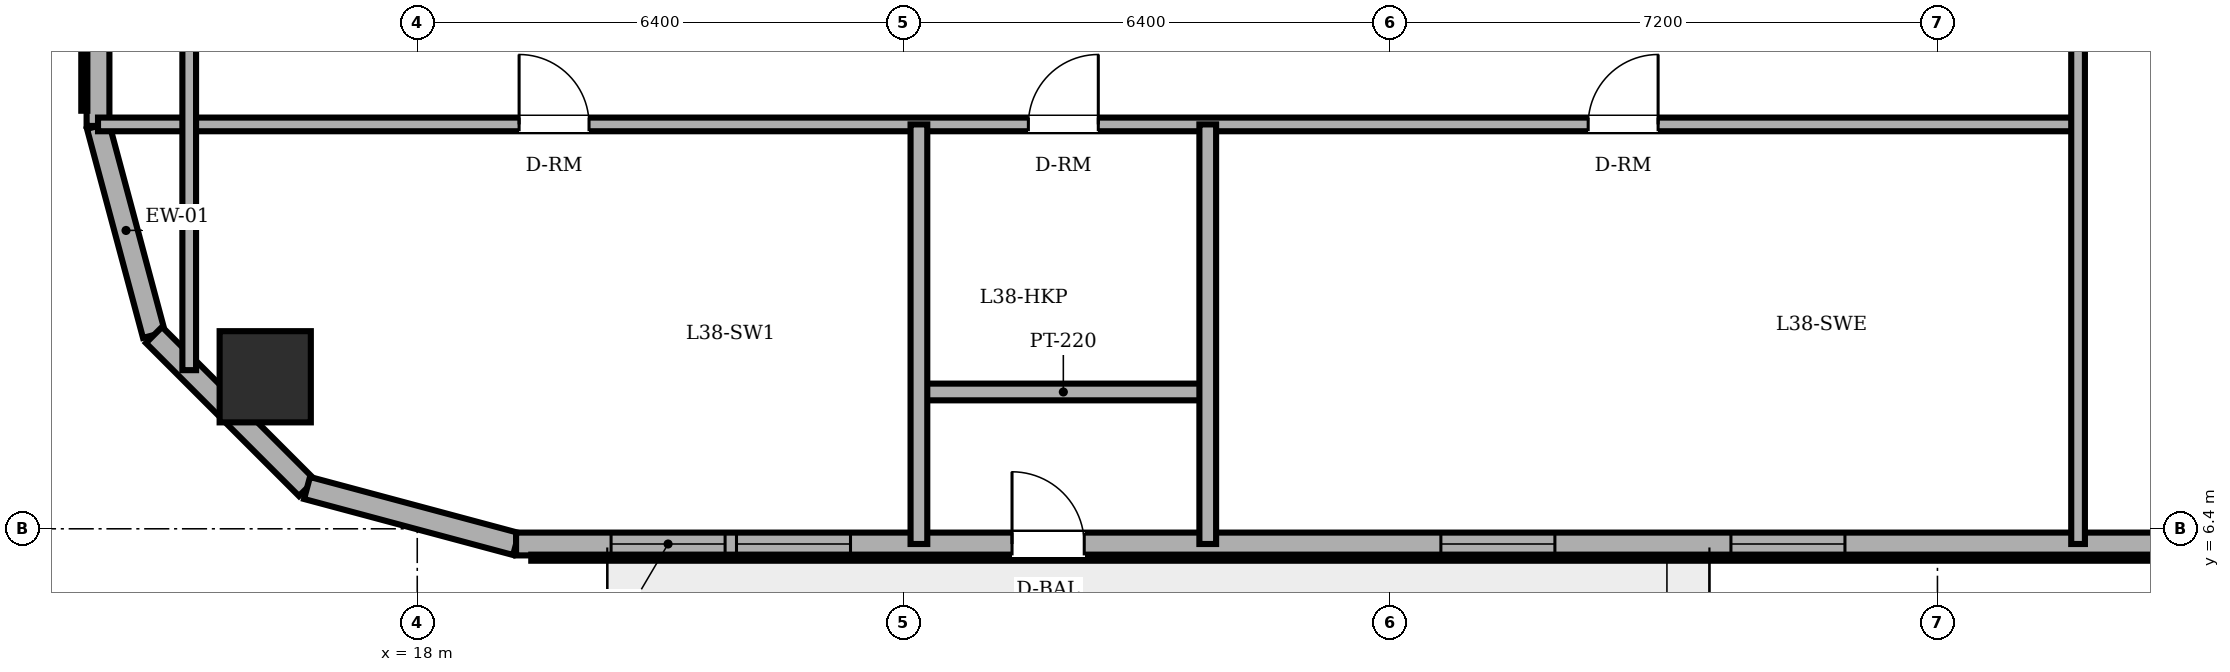
"""IFC4 building model, lengths in metres.
Left out: names, types, materials, properties, quantities, classifications, styles, units other than length and angle.
Written with IfcOpenShell. Run it as: python <this file> out.ifc"""

import sys

from ifc_helpers import new_model, si_unit, direction, frame, frame_2d, origin, origin_2d, place, context, subcontext, project, spatial, rectangle, circle, extrude, element, fill, save


model = new_model("IFC4")
c1 = context("Model", 3, precision=1e-05, world=origin(), true_north=direction((0.0, 1.0)))
c2 = subcontext(c1, "Body", "Model", "MODEL_VIEW")
j1 = project(units=[si_unit("LENGTHUNIT", "METRE"), si_unit("PLANEANGLEUNIT", "RADIAN")], contexts=[c1])
p1 = place(None, origin())
s1 = spatial("IfcSite", under=j1, at=p1, CompositionType="ELEMENT")
p2 = place(p1, origin())
s2 = spatial("IfcBuilding", under=s1, at=p2, CompositionType="ELEMENT")
p3 = place(p2, frame((0.0, 0.0, 147.4)))
s3 = spatial("IfcBuildingStorey", under=s2, at=p3, CompositionType="ELEMENT", Elevation=147.4)
p4 = place(p3, frame((16.0, 8.4, 0.0), z_axis=(0.0, 0.0, 1.0), x_axis=(1.0, 0.0, 0.0)))
e1 = element("IfcColumn", 1, at=p4, inside=s3, PredefinedType="COLUMN", context=c2, shape_type="SweptSolid", body=[
    extrude(circle(Radius=0.6, at=origin_2d()), origin(), (0.0, 0.0, 1.0), 3.6),
])
p5 = place(p3, frame((13.8, 11.7, 0.0), z_axis=(0.0, 0.0, 1.0), x_axis=(0.258884674387, -0.965908238586, 0.0)))
e2 = element("IfcWall", 2, at=p5, inside=s3, PredefinedType="SOLIDWALL", context=c2, shape_type="SweptSolid", body=[
    extrude(rectangle(XDim=2.847, YDim=0.3, at=frame_2d((1.424, 0.0))), origin(), (0.0, 0.0, 1.0), 3.4),
])
p6 = place(p3, frame((14.537, 8.95, 0.0), z_axis=(0.0, 0.0, 1.0), x_axis=(0.707106781187, -0.707106781187, 0.0)))
e3 = element("IfcWall", 3, at=p6, inside=s3, PredefinedType="SOLIDWALL", context=c2, shape_type="SweptSolid", body=[
    extrude(rectangle(XDim=2.847, YDim=0.3, at=frame_2d((1.423, 0.0))), origin(), (0.0, 0.0, 1.0), 3.4),
])
p7 = place(p3, frame((16.55, 6.937, 0.0), z_axis=(0.0, 0.0, 1.0), x_axis=(0.965908238586, -0.258884674387, 0.0)))
e4 = element("IfcWall", 4, at=p7, inside=s3, PredefinedType="SOLIDWALL", context=c2, shape_type="SweptSolid", body=[
    extrude(rectangle(XDim=2.847, YDim=0.3, at=frame_2d((1.424, 0.0))), origin(), (0.0, 0.0, 1.0), 3.4),
])
p8 = place(p3, frame((19.3, 6.2, 0.0), z_axis=(0.0, 0.0, 1.0), x_axis=(1.0, 0.0, 0.0)))
e5 = element("IfcWall", 5, at=p8, inside=s3, PredefinedType="SOLIDWALL", context=c2, shape_type="SweptSolid", body=[
    extrude(rectangle(XDim=30.282, YDim=0.3, at=frame_2d((15.141, 0.0))), origin(), (0.0, 0.0, 1.0), 3.4),
])
p9 = place(p8, frame((6.525, 0.0, 0.0)))
e6 = element("IfcOpeningElement", 6, at=p9, cuts=e5, PredefinedType="OPENING", context=c2, shape_type="SweptSolid", body=[
    extrude(rectangle(XDim=0.95, YDim=2.2, at=frame_2d((0.475, 1.1))), frame((0.0, 0.16, 0.0), z_axis=(0.0, -1.0, 0.0), x_axis=(1.0, 0.0, 0.0)), (0.0, 0.0, 1.0), 0.32),
])
p10 = place(p8, frame((1.25, 0.0, 0.85)))
e7 = element("IfcOpeningElement", 7, at=p10, cuts=e5, PredefinedType="OPENING", context=c2, shape_type="SweptSolid", body=[
    extrude(rectangle(XDim=1.5, YDim=1.55, at=frame_2d((0.75, 0.775))), frame((0.0, 0.16, 0.0), z_axis=(0.0, -1.0, 0.0), x_axis=(1.0, 0.0, 0.0)), (0.0, 0.0, 1.0), 0.32),
])
p11 = place(p8, frame((2.9, 0.0, 0.85)))
e8 = element("IfcOpeningElement", 8, at=p11, cuts=e5, PredefinedType="OPENING", context=c2, shape_type="SweptSolid", body=[
    extrude(rectangle(XDim=1.5, YDim=1.55, at=frame_2d((0.75, 0.775))), frame((0.0, 0.16, 0.0), z_axis=(0.0, -1.0, 0.0), x_axis=(1.0, 0.0, 0.0)), (0.0, 0.0, 1.0), 0.32),
])
p12 = place(p8, frame((12.167, 0.0, 0.85)))
e9 = element("IfcOpeningElement", 9, at=p12, cuts=e5, PredefinedType="OPENING", context=c2, shape_type="SweptSolid", body=[
    extrude(rectangle(XDim=1.5, YDim=1.55, at=frame_2d((0.75, 0.775))), frame((0.0, 0.16, 0.0), z_axis=(0.0, -1.0, 0.0), x_axis=(1.0, 0.0, 0.0)), (0.0, 0.0, 1.0), 0.32),
])
p13 = place(p8, frame((15.983, 0.0, 0.85)))
e10 = element("IfcOpeningElement", 10, at=p13, cuts=e5, PredefinedType="OPENING", context=c2, shape_type="SweptSolid", body=[
    extrude(rectangle(XDim=1.5, YDim=1.55, at=frame_2d((0.75, 0.775))), frame((0.0, 0.16, 0.0), z_axis=(0.0, -1.0, 0.0), x_axis=(1.0, 0.0, 0.0)), (0.0, 0.0, 1.0), 0.32),
])
p14 = place(p8, frame((22.484, 0.0, 0.85)))
e11 = element("IfcOpeningElement", 11, at=p14, cuts=e5, PredefinedType="OPENING", context=c2, shape_type="SweptSolid", body=[
    extrude(rectangle(XDim=1.5, YDim=1.55, at=frame_2d((0.75, 0.775))), frame((0.0, 0.16, 0.0), z_axis=(0.0, -1.0, 0.0), x_axis=(1.0, 0.0, 0.0)), (0.0, 0.0, 1.0), 0.32),
])
p15 = place(p8, frame((25.168, 0.0, 0.85)))
e12 = element("IfcOpeningElement", 12, at=p15, cuts=e5, PredefinedType="OPENING", context=c2, shape_type="SweptSolid", body=[
    extrude(rectangle(XDim=1.5, YDim=1.55, at=frame_2d((0.75, 0.775))), frame((0.0, 0.16, 0.0), z_axis=(0.0, -1.0, 0.0), x_axis=(1.0, 0.0, 0.0)), (0.0, 0.0, 1.0), 0.32),
])
p16 = place(p8, frame((28.773, 0.0, 0.85)))
e13 = element("IfcOpeningElement", 13, at=p16, cuts=e5, PredefinedType="OPENING", context=c2, shape_type="SweptSolid", body=[
    extrude(rectangle(XDim=1.05, YDim=1.55, at=frame_2d((0.525, 0.775))), frame((0.0, 0.16, 0.0), z_axis=(0.0, -1.0, 0.0), x_axis=(1.0, 0.0, 0.0)), (0.0, 0.0, 1.0), 0.32),
])
p17 = place(p3, frame((13.8, 36.3, 0.0), z_axis=(0.0, 0.0, 1.0), x_axis=(0.0, -1.0, 0.0)))
e14 = element("IfcWall", 14, at=p17, inside=s3, PredefinedType="SOLIDWALL", context=c2, shape_type="SweptSolid", body=[
    extrude(rectangle(XDim=24.6, YDim=0.3, at=frame_2d((12.3, 0.0))), origin(), (0.0, 0.0, 1.0), 3.4),
])
p18 = place(p17, frame((5.003, 0.0, 0.85)))
e15 = element("IfcOpeningElement", 15, at=p18, cuts=e14, PredefinedType="OPENING", context=c2, shape_type="SweptSolid", body=[
    extrude(rectangle(XDim=1.5, YDim=1.55, at=frame_2d((0.75, 0.775))), frame((0.0, 0.16, 0.0), z_axis=(0.0, -1.0, 0.0), x_axis=(1.0, 0.0, 0.0)), (0.0, 0.0, 1.0), 0.32),
])
p19 = place(p17, frame((8.277, 0.0, 0.85)))
e16 = element("IfcOpeningElement", 16, at=p19, cuts=e14, PredefinedType="OPENING", context=c2, shape_type="SweptSolid", body=[
    extrude(rectangle(XDim=1.5, YDim=1.55, at=frame_2d((0.75, 0.775))), frame((0.0, 0.16, 0.0), z_axis=(0.0, -1.0, 0.0), x_axis=(1.0, 0.0, 0.0)), (0.0, 0.0, 1.0), 0.32),
])
p20 = place(p17, frame((14.823, 0.0, 0.85)))
e17 = element("IfcOpeningElement", 17, at=p20, cuts=e14, PredefinedType="OPENING", context=c2, shape_type="SweptSolid", body=[
    extrude(rectangle(XDim=1.5, YDim=1.55, at=frame_2d((0.75, 0.775))), frame((0.0, 0.16, 0.0), z_axis=(0.0, -1.0, 0.0), x_axis=(1.0, 0.0, 0.0)), (0.0, 0.0, 1.0), 0.32),
])
p21 = place(p17, frame((18.097, 0.0, 0.85)))
e18 = element("IfcOpeningElement", 18, at=p21, cuts=e14, PredefinedType="OPENING", context=c2, shape_type="SweptSolid", body=[
    extrude(rectangle(XDim=1.5, YDim=1.55, at=frame_2d((0.75, 0.775))), frame((0.0, 0.16, 0.0), z_axis=(0.0, -1.0, 0.0), x_axis=(1.0, 0.0, 0.0)), (0.0, 0.0, 1.0), 0.32),
])
p22 = place(p3, frame((24.6, 8.2, 0.0), z_axis=(0.0, 0.0, 1.0), x_axis=(1.0, 0.0, 0.0)))
e19 = element("IfcWall", 19, at=p22, inside=s3, PredefinedType="PARTITIONING", context=c2, shape_type="SweptSolid", body=[
    extrude(rectangle(XDim=3.8, YDim=0.22, at=frame_2d((1.9, 0.0))), origin(), (0.0, 0.0, 1.0), 2.882),
])
p23 = place(p3, frame((13.8, 11.72, 0.0), z_axis=(0.0, 0.0, 1.0), x_axis=(1.0, 0.0, 0.0)))
e20 = element("IfcWall", 20, at=p23, inside=s3, PredefinedType="PARTITIONING", context=c2, shape_type="SweptSolid", body=[
    extrude(rectangle(XDim=26.05, YDim=0.18, at=frame_2d((13.025, 0.0))), origin(), (0.0, 0.0, 1.0), 3.4),
])
p24 = place(p23, frame((12.24, 0.0, 0.0)))
e21 = element("IfcOpeningElement", 21, at=p24, cuts=e20, PredefinedType="OPENING", context=c2, shape_type="SweptSolid", body=[
    extrude(rectangle(XDim=0.92, YDim=2.1, at=frame_2d((0.46, 1.05))), frame((0.0, 0.1, 0.0), z_axis=(0.0, -1.0, 0.0), x_axis=(1.0, 0.0, 0.0)), (0.0, 0.0, 1.0), 0.2),
])
p25 = place(p23, frame((5.54, 0.0, 0.0)))
e22 = element("IfcOpeningElement", 22, at=p25, cuts=e20, PredefinedType="OPENING", context=c2, shape_type="SweptSolid", body=[
    extrude(rectangle(XDim=0.92, YDim=2.1, at=frame_2d((0.46, 1.05))), frame((0.0, 0.1, 0.0), z_axis=(0.0, -1.0, 0.0), x_axis=(1.0, 0.0, 0.0)), (0.0, 0.0, 1.0), 0.2),
])
p26 = place(p23, frame((19.605, 0.0, 0.0)))
e23 = element("IfcOpeningElement", 23, at=p26, cuts=e20, PredefinedType="OPENING", context=c2, shape_type="SweptSolid", body=[
    extrude(rectangle(XDim=0.92, YDim=2.1, at=frame_2d((0.46, 1.05))), frame((0.0, 0.1, 0.0), z_axis=(0.0, -1.0, 0.0), x_axis=(1.0, 0.0, 0.0)), (0.0, 0.0, 1.0), 0.2),
])
p27 = place(p3, frame((15.0, 8.487, 0.0), z_axis=(0.0, 0.0, 1.0), x_axis=(0.0, 1.0, 0.0)))
e24 = element("IfcWall", 24, at=p27, inside=s3, PredefinedType="PARTITIONING", context=c2, shape_type="SweptSolid", body=[
    extrude(rectangle(XDim=5.693, YDim=0.18, at=frame_2d((2.846, 0.0))), origin(), (0.0, 0.0, 1.0), 3.4),
])
for number, where, z_axis, x_axis in (
    (25, (24.6, 6.2, 0.0), (0.0, 0.0, 1.0), (0.0, 1.0, 0.0)),
    (26, (28.4, 6.2, 0.0), (0.0, 0.0, 1.0), (0.0, 1.0, 0.0)),
):
    element("IfcWall", number, at=place(p3, frame(where, z_axis=z_axis, x_axis=x_axis)), inside=s3, PredefinedType="PARTITIONING", context=c2, shape_type="SweptSolid", body=[
        extrude(rectangle(XDim=5.52, YDim=0.22, at=frame_2d((2.76, 0.0))), origin(), (0.0, 0.0, 1.0), 3.4),
    ])
p28 = place(p3, frame((39.85, 6.2, 0.0), z_axis=(0.0, 0.0, 1.0), x_axis=(0.0, 1.0, 0.0)))
e27 = element("IfcWall", 27, at=p28, inside=s3, PredefinedType="PARTITIONING", context=c2, shape_type="SweptSolid", body=[
    extrude(rectangle(XDim=16.62, YDim=0.18, at=frame_2d((8.31, 0.0))), origin(), (0.0, 0.0, 1.0), 3.4),
])
p29 = place(p28, frame((10.31, 0.0, 0.0)))
e28 = element("IfcOpeningElement", 28, at=p29, cuts=e27, PredefinedType="OPENING", context=c2, shape_type="SweptSolid", body=[
    extrude(rectangle(XDim=1.0, YDim=2.15, at=frame_2d((0.5, 1.075))), frame((0.0, 0.1, 0.0), z_axis=(0.0, -1.0, 0.0), x_axis=(1.0, 0.0, 0.0)), (0.0, 0.0, 1.0), 0.2),
])
p30 = place(p9, origin())
e29 = element("IfcDoor", 29, at=p30, inside=s3, OperationType="SINGLE_SWING_LEFT", PredefinedType="DOOR", context=c2, shape_type="SweptSolid", body=[
    extrude(rectangle(XDim=0.95, YDim=2.2, at=frame_2d((0.475, 1.1))), frame((0.0, 0.025, 0.0), z_axis=(0.0, -1.0, 0.0), x_axis=(1.0, 0.0, 0.0)), (0.0, 0.0, 1.0), 0.05),
])
fill(e6, e29)
p31 = place(p10, origin())
e30 = element("IfcWindow", 30, at=p31, inside=s3, PartitioningType="DOUBLE_PANEL_VERTICAL", PredefinedType="WINDOW", context=c2, shape_type="SweptSolid", body=[
    extrude(rectangle(XDim=1.5, YDim=1.55, at=frame_2d((0.75, 0.775))), frame((0.0, 0.03, 0.0), z_axis=(0.0, -1.0, 0.0), x_axis=(1.0, 0.0, 0.0)), (0.0, 0.0, 1.0), 0.06),
])
fill(e7, e30)
p32 = place(p11, origin())
e31 = element("IfcWindow", 31, at=p32, inside=s3, PartitioningType="DOUBLE_PANEL_VERTICAL", PredefinedType="WINDOW", context=c2, shape_type="SweptSolid", body=[
    extrude(rectangle(XDim=1.5, YDim=1.55, at=frame_2d((0.75, 0.775))), frame((0.0, 0.03, 0.0), z_axis=(0.0, -1.0, 0.0), x_axis=(1.0, 0.0, 0.0)), (0.0, 0.0, 1.0), 0.06),
])
fill(e8, e31)
p33 = place(p12, origin())
e32 = element("IfcWindow", 32, at=p33, inside=s3, PartitioningType="DOUBLE_PANEL_VERTICAL", PredefinedType="WINDOW", context=c2, shape_type="SweptSolid", body=[
    extrude(rectangle(XDim=1.5, YDim=1.55, at=frame_2d((0.75, 0.775))), frame((0.0, 0.03, 0.0), z_axis=(0.0, -1.0, 0.0), x_axis=(1.0, 0.0, 0.0)), (0.0, 0.0, 1.0), 0.06),
])
fill(e9, e32)
p34 = place(p13, origin())
e33 = element("IfcWindow", 33, at=p34, inside=s3, PartitioningType="DOUBLE_PANEL_VERTICAL", PredefinedType="WINDOW", context=c2, shape_type="SweptSolid", body=[
    extrude(rectangle(XDim=1.5, YDim=1.55, at=frame_2d((0.75, 0.775))), frame((0.0, 0.03, 0.0), z_axis=(0.0, -1.0, 0.0), x_axis=(1.0, 0.0, 0.0)), (0.0, 0.0, 1.0), 0.06),
])
fill(e10, e33)
p35 = place(p24, origin())
e34 = element("IfcDoor", 34, at=p35, inside=s3, OperationType="SINGLE_SWING_RIGHT", PredefinedType="DOOR", context=c2, shape_type="SweptSolid", body=[
    extrude(rectangle(XDim=0.92, YDim=2.1, at=frame_2d((0.46, 1.05))), frame((0.0, 0.025, 0.0), z_axis=(0.0, -1.0, 0.0), x_axis=(1.0, 0.0, 0.0)), (0.0, 0.0, 1.0), 0.05),
])
fill(e21, e34)
p36 = place(p25, origin())
e35 = element("IfcDoor", 35, at=p36, inside=s3, OperationType="SINGLE_SWING_LEFT", PredefinedType="DOOR", context=c2, shape_type="SweptSolid", body=[
    extrude(rectangle(XDim=0.92, YDim=2.1, at=frame_2d((0.46, 1.05))), frame((0.0, 0.025, 0.0), z_axis=(0.0, -1.0, 0.0), x_axis=(1.0, 0.0, 0.0)), (0.0, 0.0, 1.0), 0.05),
])
fill(e22, e35)
p37 = place(p26, origin())
e36 = element("IfcDoor", 36, at=p37, inside=s3, OperationType="SINGLE_SWING_RIGHT", PredefinedType="DOOR", context=c2, shape_type="SweptSolid", body=[
    extrude(rectangle(XDim=0.92, YDim=2.1, at=frame_2d((0.46, 1.05))), frame((0.0, 0.025, 0.0), z_axis=(0.0, -1.0, 0.0), x_axis=(1.0, 0.0, 0.0)), (0.0, 0.0, 1.0), 0.05),
])
fill(e23, e36)
save(model, sys.argv[1])
